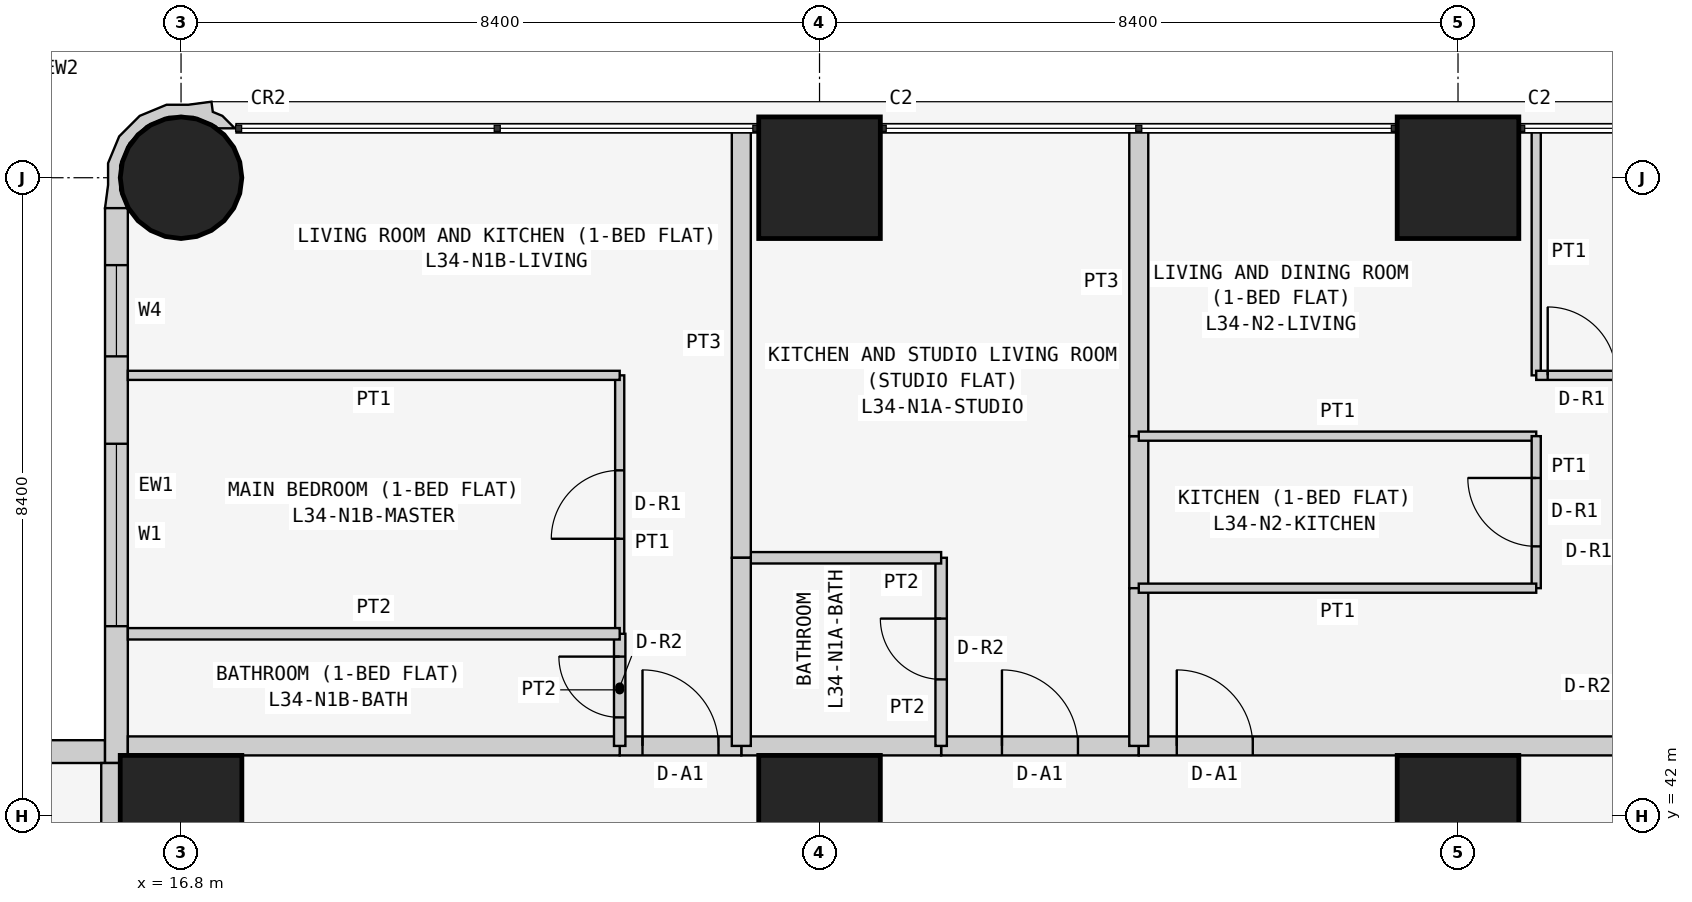
"""IFC4 building model, lengths in metres.
Left out: names, types, materials, properties, quantities, classifications, styles, units other than length and angle.
Written with IfcOpenShell. Run it as: python <this file> out.ifc"""

import sys

from ifc_helpers import new_model, si_unit, direction, frame, frame_2d, origin, origin_2d, place, context, subcontext, project, spatial, polyline, rectangle, circle, outline, extrude, element, fill, save


model = new_model("IFC4")
c1 = context("Model", 3, precision=1e-05, world=origin(), true_north=direction((0.0, 1.0)))
c2 = subcontext(c1, "Body", "Model", "MODEL_VIEW")
j1 = project(units=[si_unit("LENGTHUNIT", "METRE"), si_unit("PLANEANGLEUNIT", "RADIAN")], contexts=[c1])
p1 = place(None, origin())
s1 = spatial("IfcSite", under=j1, at=p1, CompositionType="ELEMENT")
p2 = place(p1, origin())
s2 = spatial("IfcBuilding", under=s1, at=p2, CompositionType="ELEMENT")
p3 = place(p2, frame((0.0, 0.0, 134.1)))
s3 = spatial("IfcBuildingStorey", under=s2, at=p3, CompositionType="ELEMENT", Elevation=134.1)
p4 = place(p3, frame((16.8, 42.0, 0.0), z_axis=(0.0, 0.0, 1.0), x_axis=(1.0, 0.0, 0.0)))
e1 = element("IfcColumn", 1, at=p4, inside=s3, PredefinedType="COLUMN", context=c2, shape_type="SweptSolid", body=[
    extrude(rectangle(XDim=1.6, YDim=1.6, at=origin_2d()), origin(), (0.0, 0.0, 1.0), 3.6),
])
p5 = place(p3, frame((16.8, 50.4, 0.0), z_axis=(0.0, 0.0, 1.0), x_axis=(1.0, 0.0, 0.0)))
e2 = element("IfcColumn", 2, at=p5, inside=s3, PredefinedType="COLUMN", context=c2, shape_type="SweptSolid", body=[
    extrude(circle(Radius=0.8, at=origin_2d()), origin(), (0.0, 0.0, 1.0), 3.6),
])
for number, where, z_axis, x_axis in (
    (3, (25.2, 42.0, 0.0), (0.0, 0.0, 1.0), (1.0, 0.0, 0.0)),
    (4, (25.2, 50.4, 0.0), (0.0, 0.0, 1.0), (1.0, 0.0, 0.0)),
    (5, (33.6, 42.0, 0.0), (0.0, 0.0, 1.0), (1.0, 0.0, 0.0)),
    (6, (33.6, 50.4, 0.0), (0.0, 0.0, 1.0), (1.0, 0.0, 0.0)),
):
    element("IfcColumn", number, at=place(p3, frame(where, z_axis=z_axis, x_axis=x_axis)), inside=s3, PredefinedType="COLUMN", context=c2, shape_type="SweptSolid", body=[
        extrude(rectangle(XDim=1.6, YDim=1.6, at=origin_2d()), origin(), (0.0, 0.0, 1.0), 3.6),
    ])
p6 = place(p3, frame((15.8, 42.85, 0.0), z_axis=(0.0, 0.0, 1.0), x_axis=(-1.0, 0.0, 0.0)))
e7 = element("IfcWall", 7, at=p6, inside=s3, PredefinedType="SOLIDWALL", context=c2, shape_type="SweptSolid", body=[
    extrude(rectangle(XDim=15.4, YDim=0.3, at=frame_2d((7.7, 0.0))), origin(), (0.0, 0.0, 1.0), 3.45),
])
p7 = place(p6, frame((1.2, 0.0, 0.9)))
e8 = element("IfcOpeningElement", 8, at=p7, cuts=e7, PredefinedType="OPENING", context=c2, shape_type="SweptSolid", body=[
    extrude(rectangle(XDim=1.8, YDim=1.5, at=frame_2d((0.9, 0.75))), frame((0.0, 0.16, 0.0), z_axis=(0.0, -1.0, 0.0), x_axis=(1.0, 0.0, 0.0)), (0.0, 0.0, 1.0), 0.32),
])
p8 = place(p6, frame((4.95, 0.0, 1.5)))
e9 = element("IfcOpeningElement", 9, at=p8, cuts=e7, PredefinedType="OPENING", context=c2, shape_type="SweptSolid", body=[
    extrude(rectangle(XDim=0.9, YDim=0.7, at=frame_2d((0.45, 0.35))), frame((0.0, 0.16, 0.0), z_axis=(0.0, -1.0, 0.0), x_axis=(1.0, 0.0, 0.0)), (0.0, 0.0, 1.0), 0.32),
])
p9 = place(p6, frame((8.5, 0.0, 0.9)))
e10 = element("IfcOpeningElement", 10, at=p9, cuts=e7, PredefinedType="OPENING", context=c2, shape_type="SweptSolid", body=[
    extrude(rectangle(XDim=1.8, YDim=1.5, at=frame_2d((0.9, 0.75))), frame((0.0, 0.16, 0.0), z_axis=(0.0, -1.0, 0.0), x_axis=(1.0, 0.0, 0.0)), (0.0, 0.0, 1.0), 0.32),
])
p10 = place(p6, frame((12.5, 0.0, 0.0)))
e11 = element("IfcOpeningElement", 11, at=p10, cuts=e7, PredefinedType="OPENING", context=c2, shape_type="SweptSolid", body=[
    extrude(rectangle(XDim=0.9, YDim=2.4, at=frame_2d((0.45, 1.2))), frame((0.0, 0.16, 0.0), z_axis=(0.0, -1.0, 0.0), x_axis=(1.0, 0.0, 0.0)), (0.0, 0.0, 1.0), 0.32),
])
p11 = place(p6, frame((13.5, 0.0, 0.9)))
e12 = element("IfcOpeningElement", 12, at=p11, cuts=e7, PredefinedType="OPENING", context=c2, shape_type="SweptSolid", body=[
    extrude(rectangle(XDim=1.2, YDim=1.5, at=frame_2d((0.6, 0.75))), frame((0.0, 0.16, 0.0), z_axis=(0.0, -1.0, 0.0), x_axis=(1.0, 0.0, 0.0)), (0.0, 0.0, 1.0), 0.32),
])
p12 = place(p3, frame((15.95, 50.0, 0.0), z_axis=(0.0, 0.0, 1.0), x_axis=(0.0, -1.0, 0.0)))
e13 = element("IfcWall", 13, at=p12, inside=s3, PredefinedType="SOLIDWALL", context=c2, shape_type="SweptSolid", body=[
    extrude(rectangle(XDim=7.3, YDim=0.3, at=frame_2d((3.65, 0.0))), origin(), (0.0, 0.0, 1.0), 3.45),
])
p13 = place(p12, frame((3.1, 0.0, 0.9)))
e14 = element("IfcOpeningElement", 14, at=p13, cuts=e13, PredefinedType="OPENING", context=c2, shape_type="SweptSolid", body=[
    extrude(rectangle(XDim=2.4, YDim=1.5, at=frame_2d((1.2, 0.75))), frame((0.0, 0.16, 0.0), z_axis=(0.0, -1.0, 0.0), x_axis=(1.0, 0.0, 0.0)), (0.0, 0.0, 1.0), 0.32),
])
p14 = place(p12, frame((0.75, 0.0, 0.9)))
e15 = element("IfcOpeningElement", 15, at=p14, cuts=e13, PredefinedType="OPENING", context=c2, shape_type="SweptSolid", body=[
    extrude(rectangle(XDim=1.2, YDim=1.5, at=frame_2d((0.6, 0.75))), frame((0.0, 0.16, 0.0), z_axis=(0.0, -1.0, 0.0), x_axis=(1.0, 0.0, 0.0)), (0.0, 0.0, 1.0), 0.32),
])
p15 = place(p3, frame((17.448, 50.995, 0.0), z_axis=(0.0, 0.0, 1.0), x_axis=(-0.343276641956, 0.93923434088, 0.0)))
e16 = element("IfcWall", 16, at=p15, inside=s3, PredefinedType="SOLIDWALL", context=c2, shape_type="SweptSolid", body=[
    extrude(outline(polyline([(0.241, 0.023), (0.333, 0.124), (0.465, 0.094), (0.532, 0.393), (0.631, 0.663), (0.614, 1.045), (0.454, 1.391), (0.172, 1.649), (-0.098, 1.748), (-0.369, 1.89), (-0.509, 1.621), (-0.491, 1.615), (-0.479, 1.609), (-0.211, 1.62), (0.088, 1.511), (0.323, 1.295), (0.457, 1.006), (0.47, 0.688), (0.361, 0.389), (0.145, 0.154), (0.108, 0.137), (0.031, -0.075), (0.241, 0.023)])), origin(), (0.0, 0.0, 1.0), 3.45),
])
p16 = place(p3, frame((26.8, 42.925, 0.0), z_axis=(0.0, 0.0, 1.0), x_axis=(1.0, 0.0, 0.0)))
e17 = element("IfcWall", 17, at=p16, inside=s3, PredefinedType="PARTITIONING", context=c2, shape_type="SweptSolid", body=[
    extrude(rectangle(XDim=2.6, YDim=0.25, at=frame_2d((1.3, 0.0))), origin(), (0.0, 0.0, 1.0), 3.45),
])
p17 = place(p16, frame((0.8, 0.0, 0.0)))
e18 = element("IfcOpeningElement", 18, at=p17, cuts=e17, PredefinedType="OPENING", context=c2, shape_type="SweptSolid", body=[
    extrude(rectangle(XDim=1.0, YDim=2.1, at=frame_2d((0.5, 1.05))), frame((0.0, 0.135, 0.0), z_axis=(0.0, -1.0, 0.0), x_axis=(1.0, 0.0, 0.0)), (0.0, 0.0, 1.0), 0.27),
])
p18 = place(p3, frame((24.171, 42.925, 0.0), z_axis=(0.0, 0.0, 1.0), x_axis=(1.0, 0.0, 0.0)))
e19 = element("IfcWall", 19, at=p18, inside=s3, PredefinedType="PARTITIONING", context=c2, shape_type="SweptSolid", body=[
    extrude(rectangle(XDim=2.629, YDim=0.25, at=frame_2d((1.314, 0.0))), origin(), (0.0, 0.0, 1.0), 3.45),
])
p19 = place(p3, frame((22.571, 42.925, 0.0), z_axis=(0.0, 0.0, 1.0), x_axis=(1.0, 0.0, 0.0)))
e20 = element("IfcWall", 20, at=p19, inside=s3, PredefinedType="PARTITIONING", context=c2, shape_type="SweptSolid", body=[
    extrude(rectangle(XDim=1.6, YDim=0.25, at=frame_2d((0.8, 0.0))), origin(), (0.0, 0.0, 1.0), 3.45),
])
p20 = place(p19, frame((0.3, 0.0, 0.0)))
e21 = element("IfcOpeningElement", 21, at=p20, cuts=e20, PredefinedType="OPENING", context=c2, shape_type="SweptSolid", body=[
    extrude(rectangle(XDim=1.0, YDim=2.1, at=frame_2d((0.5, 1.05))), frame((0.0, 0.135, 0.0), z_axis=(0.0, -1.0, 0.0), x_axis=(1.0, 0.0, 0.0)), (0.0, 0.0, 1.0), 0.27),
])
p21 = place(p3, frame((16.1, 42.925, 0.0), z_axis=(0.0, 0.0, 1.0), x_axis=(1.0, 0.0, 0.0)))
e22 = element("IfcWall", 22, at=p21, inside=s3, PredefinedType="PARTITIONING", context=c2, shape_type="SweptSolid", body=[
    extrude(rectangle(XDim=6.471, YDim=0.25, at=frame_2d((3.235, 0.0))), origin(), (0.0, 0.0, 1.0), 3.45),
])
p22 = place(p3, frame((29.4, 42.925, 0.0), z_axis=(0.0, 0.0, 1.0), x_axis=(1.0, 0.0, 0.0)))
e23 = element("IfcWall", 23, at=p22, inside=s3, PredefinedType="PARTITIONING", context=c2, shape_type="SweptSolid", body=[
    extrude(rectangle(XDim=6.429, YDim=0.25, at=frame_2d((3.215, 0.0))), origin(), (0.0, 0.0, 1.0), 3.45),
])
p23 = place(p22, frame((0.5, 0.0, 0.0)))
e24 = element("IfcOpeningElement", 24, at=p23, cuts=e23, PredefinedType="OPENING", context=c2, shape_type="SweptSolid", body=[
    extrude(rectangle(XDim=1.0, YDim=2.1, at=frame_2d((0.5, 1.05))), frame((0.0, 0.135, 0.0), z_axis=(0.0, -1.0, 0.0), x_axis=(1.0, 0.0, 0.0)), (0.0, 0.0, 1.0), 0.27),
])
p24 = place(p3, frame((15.875, 36.229, 0.0), z_axis=(0.0, 0.0, 1.0), x_axis=(0.0, 1.0, 0.0)))
e25 = element("IfcWall", 25, at=p24, inside=s3, PredefinedType="PARTITIONING", context=c2, shape_type="SweptSolid", body=[
    extrude(rectangle(XDim=6.471, YDim=0.25, at=frame_2d((3.235, 0.0))), origin(), (0.0, 0.0, 1.0), 3.45),
])
p25 = place(p3, frame((26.8, 42.925, 0.0), z_axis=(0.0, 0.0, 1.0), x_axis=(0.0, 1.0, 0.0)))
e26 = element("IfcWall", 26, at=p25, inside=s3, PredefinedType="PARTITIONING", context=c2, shape_type="SweptSolid", body=[
    extrude(rectangle(XDim=2.475, YDim=0.15, at=frame_2d((1.237, 0.0))), origin(), (0.0, 0.0, 1.0), 3.45),
])
p26 = place(p25, frame((0.875, 0.0, 0.0)))
e27 = element("IfcOpeningElement", 27, at=p26, cuts=e26, PredefinedType="OPENING", context=c2, shape_type="SweptSolid", body=[
    extrude(rectangle(XDim=0.8, YDim=2.1, at=frame_2d((0.4, 1.05))), frame((0.0, 0.085, 0.0), z_axis=(0.0, -1.0, 0.0), x_axis=(1.0, 0.0, 0.0)), (0.0, 0.0, 1.0), 0.17),
])
p27 = place(p3, frame((26.8, 45.4, 0.0), z_axis=(0.0, 0.0, 1.0), x_axis=(-1.0, 0.0, 0.0)))
e28 = element("IfcWall", 28, at=p27, inside=s3, PredefinedType="PARTITIONING", context=c2, shape_type="SweptSolid", body=[
    extrude(rectangle(XDim=2.629, YDim=0.15, at=frame_2d((1.314, 0.0))), origin(), (0.0, 0.0, 1.0), 3.45),
])
p28 = place(p3, frame((24.171, 45.4, 0.0), z_axis=(0.0, 0.0, 1.0), x_axis=(0.0, 1.0, 0.0)))
e29 = element("IfcWall", 29, at=p28, inside=s3, PredefinedType="PARTITIONING", context=c2, shape_type="SweptSolid", body=[
    extrude(rectangle(XDim=5.65, YDim=0.25, at=frame_2d((2.825, 0.0))), origin(), (0.0, 0.0, 1.0), 3.45),
])
p29 = place(p3, frame((29.4, 47.0, 0.0), z_axis=(0.0, 0.0, 1.0), x_axis=(0.0, -1.0, 0.0)))
e30 = element("IfcWall", 30, at=p29, inside=s3, PredefinedType="PARTITIONING", context=c2, shape_type="SweptSolid", body=[
    extrude(rectangle(XDim=2.0, YDim=0.25, at=frame_2d((1.0, 0.0))), origin(), (0.0, 0.0, 1.0), 2.848),
])
p30 = place(p3, frame((29.4, 45.0, 0.0), z_axis=(0.0, 0.0, 1.0), x_axis=(0.0, -1.0, 0.0)))
e31 = element("IfcWall", 31, at=p30, inside=s3, PredefinedType="PARTITIONING", context=c2, shape_type="SweptSolid", body=[
    extrude(rectangle(XDim=2.075, YDim=0.25, at=frame_2d((1.038, 0.0))), origin(), (0.0, 0.0, 1.0), 2.848),
])
p31 = place(p3, frame((29.4, 51.05, 0.0), z_axis=(0.0, 0.0, 1.0), x_axis=(0.0, -1.0, 0.0)))
e32 = element("IfcWall", 32, at=p31, inside=s3, PredefinedType="PARTITIONING", context=c2, shape_type="SweptSolid", body=[
    extrude(rectangle(XDim=4.05, YDim=0.25, at=frame_2d((2.025, 0.0))), origin(), (0.0, 0.0, 1.0), 2.848),
])
p32 = place(p3, frame((24.171, 45.4, 0.0), z_axis=(0.0, 0.0, 1.0), x_axis=(0.0, -1.0, 0.0)))
e33 = element("IfcWall", 33, at=p32, inside=s3, PredefinedType="PARTITIONING", context=c2, shape_type="SweptSolid", body=[
    extrude(rectangle(XDim=2.475, YDim=0.25, at=frame_2d((1.237, 0.0))), origin(), (0.0, 0.0, 1.0), 3.45),
])
p33 = place(p3, frame((22.571, 42.925, 0.0), z_axis=(0.0, 0.0, 1.0), x_axis=(0.0, 1.0, 0.0)))
e34 = element("IfcWall", 34, at=p33, inside=s3, PredefinedType="PARTITIONING", context=c2, shape_type="SweptSolid", body=[
    extrude(rectangle(XDim=1.475, YDim=0.15, at=frame_2d((0.737, 0.0))), origin(), (0.0, 0.0, 1.0), 3.45),
])
p34 = place(p33, frame((0.375, 0.0, 0.0)))
e35 = element("IfcOpeningElement", 35, at=p34, cuts=e34, PredefinedType="OPENING", context=c2, shape_type="SweptSolid", body=[
    extrude(rectangle(XDim=0.8, YDim=2.1, at=frame_2d((0.4, 1.05))), frame((0.0, 0.085, 0.0), z_axis=(0.0, -1.0, 0.0), x_axis=(1.0, 0.0, 0.0)), (0.0, 0.0, 1.0), 0.17),
])
p35 = place(p3, frame((22.571, 44.4, 0.0), z_axis=(0.0, 0.0, 1.0), x_axis=(0.0, 1.0, 0.0)))
e36 = element("IfcWall", 36, at=p35, inside=s3, PredefinedType="PARTITIONING", context=c2, shape_type="SweptSolid", body=[
    extrude(rectangle(XDim=3.4, YDim=0.12, at=frame_2d((1.7, 0.0))), origin(), (0.0, 0.0, 1.0), 3.45),
])
p36 = place(p35, frame((1.25, 0.0, 0.0)))
e37 = element("IfcOpeningElement", 37, at=p36, cuts=e36, PredefinedType="OPENING", context=c2, shape_type="SweptSolid", body=[
    extrude(rectangle(XDim=0.9, YDim=2.1, at=frame_2d((0.45, 1.05))), frame((0.0, 0.07, 0.0), z_axis=(0.0, -1.0, 0.0), x_axis=(1.0, 0.0, 0.0)), (0.0, 0.0, 1.0), 0.14),
])
p37 = place(p3, frame((22.571, 47.8, 0.0), z_axis=(0.0, 0.0, 1.0), x_axis=(-1.0, 0.0, 0.0)))
e38 = element("IfcWall", 38, at=p37, inside=s3, PredefinedType="PARTITIONING", context=c2, shape_type="SweptSolid", body=[
    extrude(rectangle(XDim=6.471, YDim=0.12, at=frame_2d((3.235, 0.0))), origin(), (0.0, 0.0, 1.0), 3.45),
])
p38 = place(p3, frame((22.571, 44.4, 0.0), z_axis=(0.0, 0.0, 1.0), x_axis=(-1.0, 0.0, 0.0)))
e39 = element("IfcWall", 39, at=p38, inside=s3, PredefinedType="PARTITIONING", context=c2, shape_type="SweptSolid", body=[
    extrude(rectangle(XDim=6.471, YDim=0.15, at=frame_2d((3.235, 0.0))), origin(), (0.0, 0.0, 1.0), 3.45),
])
p39 = place(p3, frame((29.4, 47.0, 0.0), z_axis=(0.0, 0.0, 1.0), x_axis=(1.0, 0.0, 0.0)))
e40 = element("IfcWall", 40, at=p39, inside=s3, PredefinedType="PARTITIONING", context=c2, shape_type="SweptSolid", body=[
    extrude(rectangle(XDim=5.229, YDim=0.12, at=frame_2d((2.615, 0.0))), origin(), (0.0, 0.0, 1.0), 3.45),
])
p40 = place(p3, frame((34.629, 47.0, 0.0), z_axis=(0.0, 0.0, 1.0), x_axis=(0.0, -1.0, 0.0)))
e41 = element("IfcWall", 41, at=p40, inside=s3, PredefinedType="PARTITIONING", context=c2, shape_type="SweptSolid", body=[
    extrude(rectangle(XDim=2.0, YDim=0.12, at=frame_2d((1.0, 0.0))), origin(), (0.0, 0.0, 1.0), 3.45),
])
p41 = place(p40, frame((0.55, 0.0, 0.0)))
e42 = element("IfcOpeningElement", 42, at=p41, cuts=e41, PredefinedType="OPENING", context=c2, shape_type="SweptSolid", body=[
    extrude(rectangle(XDim=0.9, YDim=2.1, at=frame_2d((0.45, 1.05))), frame((0.0, 0.07, 0.0), z_axis=(0.0, -1.0, 0.0), x_axis=(1.0, 0.0, 0.0)), (0.0, 0.0, 1.0), 0.14),
])
p42 = place(p3, frame((34.629, 45.0, 0.0), z_axis=(0.0, 0.0, 1.0), x_axis=(-1.0, 0.0, 0.0)))
e43 = element("IfcWall", 43, at=p42, inside=s3, PredefinedType="PARTITIONING", context=c2, shape_type="SweptSolid", body=[
    extrude(rectangle(XDim=5.229, YDim=0.12, at=frame_2d((2.615, 0.0))), origin(), (0.0, 0.0, 1.0), 3.45),
])
p43 = place(p3, frame((34.629, 51.05, 0.0), z_axis=(0.0, 0.0, 1.0), x_axis=(0.0, -1.0, 0.0)))
e44 = element("IfcWall", 44, at=p43, inside=s3, PredefinedType="PARTITIONING", context=c2, shape_type="SweptSolid", body=[
    extrude(rectangle(XDim=3.25, YDim=0.12, at=frame_2d((1.625, 0.0))), origin(), (0.0, 0.0, 1.0), 3.45),
])
p44 = place(p3, frame((34.629, 47.8, 0.0), z_axis=(0.0, 0.0, 1.0), x_axis=(1.0, 0.0, 0.0)))
e45 = element("IfcWall", 45, at=p44, inside=s3, PredefinedType="PARTITIONING", context=c2, shape_type="SweptSolid", body=[
    extrude(rectangle(XDim=1.2, YDim=0.12, at=frame_2d((0.6, 0.0))), origin(), (0.0, 0.0, 1.0), 3.45),
])
p45 = place(p44, frame((0.151, 0.0, 0.0)))
e46 = element("IfcOpeningElement", 46, at=p45, cuts=e45, PredefinedType="OPENING", context=c2, shape_type="SweptSolid", body=[
    extrude(rectangle(XDim=0.9, YDim=2.1, at=frame_2d((0.45, 1.05))), frame((0.0, 0.07, 0.0), z_axis=(0.0, -1.0, 0.0), x_axis=(1.0, 0.0, 0.0)), (0.0, 0.0, 1.0), 0.14),
])
p46 = place(p13, origin())
e47 = element("IfcWindow", 47, at=p46, inside=s3, PartitioningType="SINGLE_PANEL", PredefinedType="WINDOW", context=c2, shape_type="SweptSolid", body=[
    extrude(rectangle(XDim=2.4, YDim=1.5, at=frame_2d((1.2, 0.75))), frame((0.0, 0.03, 0.0), z_axis=(0.0, -1.0, 0.0), x_axis=(1.0, 0.0, 0.0)), (0.0, 0.0, 1.0), 0.06),
])
fill(e14, e47)
p47 = place(p14, origin())
e48 = element("IfcWindow", 48, at=p47, inside=s3, PartitioningType="SINGLE_PANEL", PredefinedType="WINDOW", context=c2, shape_type="SweptSolid", body=[
    extrude(rectangle(XDim=1.2, YDim=1.5, at=frame_2d((0.6, 0.75))), frame((0.0, 0.03, 0.0), z_axis=(0.0, -1.0, 0.0), x_axis=(1.0, 0.0, 0.0)), (0.0, 0.0, 1.0), 0.06),
])
fill(e15, e48)
p48 = place(p17, origin())
e49 = element("IfcDoor", 49, at=p48, inside=s3, OperationType="SINGLE_SWING_LEFT", PredefinedType="DOOR", context=c2, shape_type="SweptSolid", body=[
    extrude(rectangle(XDim=1.0, YDim=2.1, at=frame_2d((0.5, 1.05))), frame((0.0, 0.025, 0.0), z_axis=(0.0, -1.0, 0.0), x_axis=(1.0, 0.0, 0.0)), (0.0, 0.0, 1.0), 0.05),
])
fill(e18, e49)
p49 = place(p26, origin())
e50 = element("IfcDoor", 50, at=p49, inside=s3, OperationType="SINGLE_SWING_RIGHT", PredefinedType="DOOR", context=c2, shape_type="SweptSolid", body=[
    extrude(rectangle(XDim=0.8, YDim=2.1, at=frame_2d((0.4, 1.05))), frame((0.0, 0.025, 0.0), z_axis=(0.0, -1.0, 0.0), x_axis=(1.0, 0.0, 0.0)), (0.0, 0.0, 1.0), 0.05),
])
fill(e27, e50)
p50 = place(p20, origin())
e51 = element("IfcDoor", 51, at=p50, inside=s3, OperationType="SINGLE_SWING_LEFT", PredefinedType="DOOR", context=c2, shape_type="SweptSolid", body=[
    extrude(rectangle(XDim=1.0, YDim=2.1, at=frame_2d((0.5, 1.05))), frame((0.0, 0.025, 0.0), z_axis=(0.0, -1.0, 0.0), x_axis=(1.0, 0.0, 0.0)), (0.0, 0.0, 1.0), 0.05),
])
fill(e21, e51)
p51 = place(p34, origin())
e52 = element("IfcDoor", 52, at=p51, inside=s3, OperationType="SINGLE_SWING_RIGHT", PredefinedType="DOOR", context=c2, shape_type="SweptSolid", body=[
    extrude(rectangle(XDim=0.8, YDim=2.1, at=frame_2d((0.4, 1.05))), frame((0.0, 0.025, 0.0), z_axis=(0.0, -1.0, 0.0), x_axis=(1.0, 0.0, 0.0)), (0.0, 0.0, 1.0), 0.05),
])
fill(e35, e52)
p52 = place(p36, origin())
e53 = element("IfcDoor", 53, at=p52, inside=s3, OperationType="SINGLE_SWING_LEFT", PredefinedType="DOOR", context=c2, shape_type="SweptSolid", body=[
    extrude(rectangle(XDim=0.9, YDim=2.1, at=frame_2d((0.45, 1.05))), frame((0.0, 0.025, 0.0), z_axis=(0.0, -1.0, 0.0), x_axis=(1.0, 0.0, 0.0)), (0.0, 0.0, 1.0), 0.05),
])
fill(e37, e53)
p53 = place(p23, origin())
e54 = element("IfcDoor", 54, at=p53, inside=s3, OperationType="SINGLE_SWING_LEFT", PredefinedType="DOOR", context=c2, shape_type="SweptSolid", body=[
    extrude(rectangle(XDim=1.0, YDim=2.1, at=frame_2d((0.5, 1.05))), frame((0.0, 0.025, 0.0), z_axis=(0.0, -1.0, 0.0), x_axis=(1.0, 0.0, 0.0)), (0.0, 0.0, 1.0), 0.05),
])
fill(e24, e54)
p54 = place(p41, frame((0.9, 0.0, 0.0), z_axis=(0.0, 0.0, 1.0), x_axis=(-1.0, 0.0, 0.0)))
e55 = element("IfcDoor", 55, at=p54, inside=s3, OperationType="SINGLE_SWING_RIGHT", PredefinedType="DOOR", context=c2, shape_type="SweptSolid", body=[
    extrude(rectangle(XDim=0.9, YDim=2.1, at=frame_2d((0.45, 1.05))), frame((0.0, 0.025, 0.0), z_axis=(0.0, -1.0, 0.0), x_axis=(1.0, 0.0, 0.0)), (0.0, 0.0, 1.0), 0.05),
])
fill(e42, e55)
p55 = place(p45, origin())
e56 = element("IfcDoor", 56, at=p55, inside=s3, OperationType="SINGLE_SWING_LEFT", PredefinedType="DOOR", context=c2, shape_type="SweptSolid", body=[
    extrude(rectangle(XDim=0.9, YDim=2.1, at=frame_2d((0.45, 1.05))), frame((0.0, 0.025, 0.0), z_axis=(0.0, -1.0, 0.0), x_axis=(1.0, 0.0, 0.0)), (0.0, 0.0, 1.0), 0.05),
])
fill(e46, e56)
save(model, sys.argv[1])
